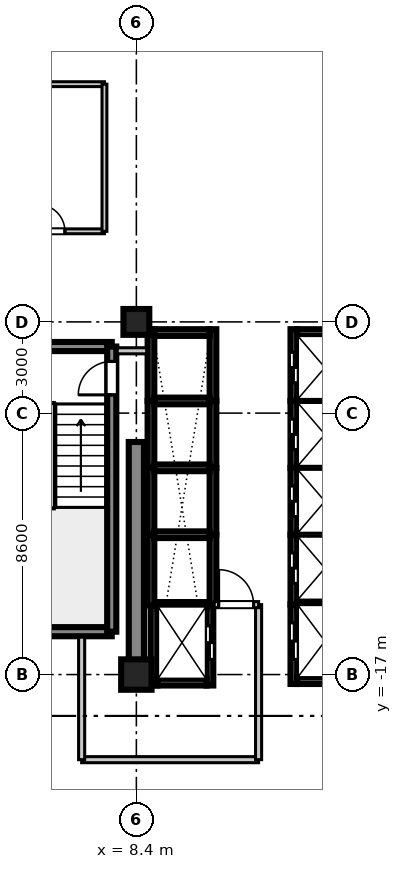
"""IFC4 building model, lengths in metres.
Left out: names, types, materials, properties, quantities, classifications, styles, units other than length and angle.
Written with IfcOpenShell. Run it as: python <this file> out.ifc"""

import sys

from ifc_helpers import new_model, si_unit, direction, frame, frame_2d, origin, origin_2d, place, context, subcontext, project, spatial, rectangle, extrude, source, transform, mapped, element, fill, save


model = new_model("IFC4")
c1 = context("Model", 3, precision=1e-05, world=origin(), true_north=direction((0.0, 1.0)))
c2 = subcontext(c1, "Body", "Model", "MODEL_VIEW")
j1 = project(units=[si_unit("LENGTHUNIT", "METRE"), si_unit("PLANEANGLEUNIT", "RADIAN")], contexts=[c1])
p1 = place(None, origin())
s1 = spatial("IfcSite", under=j1, at=p1, CompositionType="ELEMENT")
p2 = place(p1, origin())
s2 = spatial("IfcBuilding", under=s1, at=p2, CompositionType="ELEMENT")
p3 = place(p2, frame((0.0, 0.0, 227.1)))
s3 = spatial("IfcBuildingStorey", under=s2, at=p3, CompositionType="ELEMENT", Elevation=227.1)
m1 = source(origin(), c2, "Body", "SweptSolid", [
    extrude(rectangle(XDim=1.0, YDim=1.0, at=origin_2d()), origin(), (0.0, 0.0, 1.0), 3.655),
])
p4 = place(p3, frame((8.4, -17.0, 0.0), z_axis=(0.0, 0.0, 1.0), x_axis=(1.0, 0.0, 0.0)))
e1 = element("IfcColumn", 1, at=p4, inside=s3, PredefinedType="COLUMN", context=c2, shape_type="MappedRepresentation", body=[
    mapped(m1, transform((0.0, 0.0, 0.0), scale=1.0)),
])
m2 = source(origin(), c2, "Body", "SweptSolid", [
    extrude(rectangle(XDim=0.85, YDim=0.85, at=origin_2d()), origin(), (0.0, 0.0, 1.0), 3.655),
])
p5 = place(p3, frame((8.4, -5.4, 0.0), z_axis=(0.0, 0.0, 1.0), x_axis=(1.0, 0.0, 0.0)))
e2 = element("IfcColumn", 2, at=p5, inside=s3, PredefinedType="PILASTER", context=c2, shape_type="MappedRepresentation", body=[
    mapped(m2, transform((0.0, 0.0, 0.0), scale=1.0)),
])
m3 = source(origin(), c2, "Body", "SweptSolid", [
    extrude(rectangle(XDim=7.65, YDim=0.5, at=frame_2d((3.825, 0.0))), origin(), (0.0, 0.0, 1.0), 3.41),
])
p6 = place(p3, frame((8.4, -17.0, 0.0), z_axis=(0.0, 0.0, 1.0), x_axis=(0.0, 1.0, 0.0)))
e3 = element("IfcWall", 3, at=p6, inside=s3, PredefinedType="SHEAR", context=c2, shape_type="MappedRepresentation", body=[
    mapped(m3, transform((0.0, 0.0, 0.0), scale=1.0)),
])
m4 = source(origin(), c2, "Body", "SweptSolid", [
    extrude(rectangle(XDim=3.98, YDim=0.3, at=frame_2d((1.99, 0.0))), origin(), (0.0, 0.0, 1.0), 3.41),
])
for number, where, z_axis, x_axis in (
    (4, (3.61, -15.59, 0.0), (0.0, 0.0, 1.0), (1.0, 0.0, 0.0)),
    (5, (3.61, -6.21, 0.0), (0.0, 0.0, 1.0), (1.0, 0.0, 0.0)),
):
    element("IfcWall", number, at=place(p3, frame(where, z_axis=z_axis, x_axis=x_axis)), inside=s3, PredefinedType="SHEAR", context=c2, shape_type="MappedRepresentation", body=[
        mapped(m4, transform((0.0, 0.0, 0.0), scale=1.0)),
    ])
m5 = source(origin(), c2, "Body", "SweptSolid", [
    extrude(rectangle(XDim=9.38, YDim=0.3, at=frame_2d((4.69, 0.0))), origin(), (0.0, 0.0, 1.0), 3.41),
])
p7 = place(p3, frame((7.59, -15.59, 0.0), z_axis=(0.0, 0.0, 1.0), x_axis=(0.0, 1.0, 0.0)))
e6 = element("IfcWall", 6, at=p7, inside=s3, PredefinedType="SHEAR", context=c2, shape_type="MappedRepresentation", body=[
    mapped(m5, transform((0.0, 0.0, 0.0), scale=1.0)),
])
p8 = place(p7, frame((7.79, 0.0, 0.0)))
e7 = element("IfcOpeningElement", 7, at=p8, cuts=e6, PredefinedType="OPENING", context=c2, shape_type="SweptSolid", body=[
    extrude(rectangle(XDim=1.1, YDim=2.15, at=frame_2d((0.55, 1.075))), frame((0.0, 0.16, 0.0), z_axis=(0.0, -1.0, 0.0), x_axis=(1.0, 0.0, 0.0)), (0.0, 0.0, 1.0), 0.32),
])
m6 = source(origin(), c2, "Body", "SweptSolid", [
    extrude(rectangle(XDim=2.36, YDim=0.22, at=frame_2d((1.18, 0.0))), origin(), (0.0, 0.0, 1.0), 3.41),
])
p9 = place(p3, frame((13.58, -8.0, 0.0), z_axis=(0.0, 0.0, 1.0), x_axis=(0.0, 1.0, 0.0)))
e8 = element("IfcWall", 8, at=p9, inside=s3, PredefinedType="SHEAR", context=c2, shape_type="MappedRepresentation", body=[
    mapped(m6, transform((0.0, 0.0, 0.0), scale=1.0)),
])
p10 = place(p9, frame((0.6, 0.0, 0.0)))
e9 = element("IfcOpeningElement", 9, at=p10, cuts=e8, PredefinedType="OPENING", context=c2, shape_type="SweptSolid", body=[
    extrude(rectangle(XDim=1.0, YDim=2.2, at=frame_2d((0.5, 1.1))), frame((0.0, 0.12, 0.0), z_axis=(0.0, -1.0, 0.0), x_axis=(1.0, 0.0, 0.0)), (0.0, 0.0, 1.0), 0.24),
])
m7 = source(origin(), c2, "Body", "SweptSolid", [
    extrude(rectangle(XDim=1.82, YDim=0.22, at=frame_2d((0.91, 0.0))), origin(), (0.0, 0.0, 1.0), 3.41),
])
p11 = place(p3, frame((13.69, -5.75, 0.0), z_axis=(0.0, 0.0, 1.0), x_axis=(1.0, 0.0, 0.0)))
e10 = element("IfcWall", 10, at=p11, inside=s3, PredefinedType="SHEAR", context=c2, shape_type="MappedRepresentation", body=[
    mapped(m7, transform((0.0, 0.0, 0.0), scale=1.0)),
])
m8 = source(origin(), c2, "Body", "SweptSolid", [
    extrude(rectangle(XDim=2.2, YDim=0.22, at=frame_2d((1.1, 0.0))), origin(), (0.0, 0.0, 1.0), 3.41),
])
p12 = place(p3, frame((13.58, -10.2, 0.0), z_axis=(0.0, 0.0, 1.0), x_axis=(0.0, 1.0, 0.0)))
e11 = element("IfcWall", 11, at=p12, inside=s3, PredefinedType="SHEAR", context=c2, shape_type="MappedRepresentation", body=[
    mapped(m8, transform((0.0, 0.0, 0.0), scale=1.0)),
])
p13 = place(p12, frame((0.6, 0.0, 0.0)))
e12 = element("IfcOpeningElement", 12, at=p13, cuts=e11, PredefinedType="OPENING", context=c2, shape_type="SweptSolid", body=[
    extrude(rectangle(XDim=1.0, YDim=2.2, at=frame_2d((0.5, 1.1))), frame((0.0, 0.12, 0.0), z_axis=(0.0, -1.0, 0.0), x_axis=(1.0, 0.0, 0.0)), (0.0, 0.0, 1.0), 0.24),
])
m9 = source(origin(), c2, "Body", "SweptSolid", [
    extrude(rectangle(XDim=1.82, YDim=0.22, at=frame_2d((0.91, 0.0))), origin(), (0.0, 0.0, 1.0), 3.7),
])
p14 = place(p3, frame((13.69, -8.0, 0.0), z_axis=(0.0, 0.0, 1.0), x_axis=(1.0, 0.0, 0.0)))
e13 = element("IfcWall", 13, at=p14, inside=s3, PredefinedType="SHEAR", context=c2, shape_type="MappedRepresentation", body=[
    mapped(m9, transform((0.0, 0.0, 0.0), scale=1.0)),
])
p15 = place(p3, frame((13.58, -12.4, 0.0), z_axis=(0.0, 0.0, 1.0), x_axis=(0.0, 1.0, 0.0)))
e14 = element("IfcWall", 14, at=p15, inside=s3, PredefinedType="SHEAR", context=c2, shape_type="MappedRepresentation", body=[
    mapped(m8, transform((0.0, 0.0, 0.0), scale=1.0)),
])
p16 = place(p15, frame((0.6, 0.0, 0.0)))
e15 = element("IfcOpeningElement", 15, at=p16, cuts=e14, PredefinedType="OPENING", context=c2, shape_type="SweptSolid", body=[
    extrude(rectangle(XDim=1.0, YDim=2.2, at=frame_2d((0.5, 1.1))), frame((0.0, 0.12, 0.0), z_axis=(0.0, -1.0, 0.0), x_axis=(1.0, 0.0, 0.0)), (0.0, 0.0, 1.0), 0.24),
])
p17 = place(p3, frame((13.69, -10.2, 0.0), z_axis=(0.0, 0.0, 1.0), x_axis=(1.0, 0.0, 0.0)))
e16 = element("IfcWall", 16, at=p17, inside=s3, PredefinedType="SHEAR", context=c2, shape_type="MappedRepresentation", body=[
    mapped(m9, transform((0.0, 0.0, 0.0), scale=1.0)),
])
m10 = source(origin(), c2, "Body", "SweptSolid", [
    extrude(rectangle(XDim=2.3, YDim=0.22, at=frame_2d((1.15, 0.0))), origin(), (0.0, 0.0, 1.0), 3.41),
])
p18 = place(p3, frame((13.58, -14.7, 0.0), z_axis=(0.0, 0.0, 1.0), x_axis=(0.0, 1.0, 0.0)))
e17 = element("IfcWall", 17, at=p18, inside=s3, PredefinedType="SHEAR", context=c2, shape_type="MappedRepresentation", body=[
    mapped(m10, transform((0.0, 0.0, 0.0), scale=1.0)),
])
p19 = place(p18, frame((0.7, 0.0, 0.0)))
e18 = element("IfcOpeningElement", 18, at=p19, cuts=e17, PredefinedType="OPENING", context=c2, shape_type="SweptSolid", body=[
    extrude(rectangle(XDim=1.0, YDim=2.2, at=frame_2d((0.5, 1.1))), frame((0.0, 0.12, 0.0), z_axis=(0.0, -1.0, 0.0), x_axis=(1.0, 0.0, 0.0)), (0.0, 0.0, 1.0), 0.24),
])
p20 = place(p3, frame((13.69, -12.4, 0.0), z_axis=(0.0, 0.0, 1.0), x_axis=(1.0, 0.0, 0.0)))
e19 = element("IfcWall", 19, at=p20, inside=s3, PredefinedType="SHEAR", context=c2, shape_type="MappedRepresentation", body=[
    mapped(m9, transform((0.0, 0.0, 0.0), scale=1.0)),
])
for number, where, z_axis, x_axis in (
    (20, (8.88, -8.0, 0.0), (0.0, 0.0, 1.0), (0.0, 1.0, 0.0)),
    (21, (10.92, -8.0, 0.0), (0.0, 0.0, 1.0), (0.0, 1.0, 0.0)),
):
    element("IfcWall", number, at=place(p3, frame(where, z_axis=z_axis, x_axis=x_axis)), inside=s3, PredefinedType="SHEAR", context=c2, shape_type="MappedRepresentation", body=[
        mapped(m6, transform((0.0, 0.0, 0.0), scale=1.0)),
    ])
p21 = place(p3, frame((8.99, -5.75, 0.0), z_axis=(0.0, 0.0, 1.0), x_axis=(1.0, 0.0, 0.0)))
e22 = element("IfcWall", 22, at=p21, inside=s3, PredefinedType="SHEAR", context=c2, shape_type="MappedRepresentation", body=[
    mapped(m7, transform((0.0, 0.0, 0.0), scale=1.0)),
])
for number, where, z_axis, x_axis in (
    (23, (8.88, -10.2, 0.0), (0.0, 0.0, 1.0), (0.0, 1.0, 0.0)),
    (24, (10.92, -10.2, 0.0), (0.0, 0.0, 1.0), (0.0, 1.0, 0.0)),
):
    element("IfcWall", number, at=place(p3, frame(where, z_axis=z_axis, x_axis=x_axis)), inside=s3, PredefinedType="SHEAR", context=c2, shape_type="MappedRepresentation", body=[
        mapped(m8, transform((0.0, 0.0, 0.0), scale=1.0)),
    ])
p22 = place(p3, frame((8.99, -8.0, 0.0), z_axis=(0.0, 0.0, 1.0), x_axis=(1.0, 0.0, 0.0)))
e25 = element("IfcWall", 25, at=p22, inside=s3, PredefinedType="SHEAR", context=c2, shape_type="MappedRepresentation", body=[
    mapped(m9, transform((0.0, 0.0, 0.0), scale=1.0)),
])
for number, where, z_axis, x_axis in (
    (26, (8.88, -12.4, 0.0), (0.0, 0.0, 1.0), (0.0, 1.0, 0.0)),
    (27, (10.92, -12.4, 0.0), (0.0, 0.0, 1.0), (0.0, 1.0, 0.0)),
):
    element("IfcWall", number, at=place(p3, frame(where, z_axis=z_axis, x_axis=x_axis)), inside=s3, PredefinedType="SHEAR", context=c2, shape_type="MappedRepresentation", body=[
        mapped(m8, transform((0.0, 0.0, 0.0), scale=1.0)),
    ])
p23 = place(p3, frame((8.99, -10.2, 0.0), z_axis=(0.0, 0.0, 1.0), x_axis=(1.0, 0.0, 0.0)))
e28 = element("IfcWall", 28, at=p23, inside=s3, PredefinedType="SHEAR", context=c2, shape_type="MappedRepresentation", body=[
    mapped(m9, transform((0.0, 0.0, 0.0), scale=1.0)),
])
m11 = source(origin(), c2, "Body", "SweptSolid", [
    extrude(rectangle(XDim=2.325, YDim=0.22, at=frame_2d((1.163, 0.0))), origin(), (0.0, 0.0, 1.0), 3.41),
])
for number, where, z_axis, x_axis in (
    (29, (8.88, -14.725, 0.0), (0.0, 0.0, 1.0), (0.0, 1.0, 0.0)),
    (30, (10.92, -14.725, 0.0), (0.0, 0.0, 1.0), (0.0, 1.0, 0.0)),
):
    element("IfcWall", number, at=place(p3, frame(where, z_axis=z_axis, x_axis=x_axis)), inside=s3, PredefinedType="SHEAR", context=c2, shape_type="MappedRepresentation", body=[
        mapped(m11, transform((0.0, 0.0, 0.0), scale=1.0)),
    ])
p24 = place(p3, frame((8.99, -12.4, 0.0), z_axis=(0.0, 0.0, 1.0), x_axis=(1.0, 0.0, 0.0)))
e31 = element("IfcWall", 31, at=p24, inside=s3, PredefinedType="SHEAR", context=c2, shape_type="MappedRepresentation", body=[
    mapped(m9, transform((0.0, 0.0, 0.0), scale=1.0)),
])
m12 = source(origin(), c2, "Body", "SweptSolid", [
    extrude(rectangle(XDim=2.635, YDim=0.22, at=frame_2d((1.317, 0.0))), origin(), (0.0, 0.0, 1.0), 3.41),
])
p25 = place(p3, frame((8.98, -17.36, 0.0), z_axis=(0.0, 0.0, 1.0), x_axis=(0.0, 1.0, 0.0)))
e32 = element("IfcWall", 32, at=p25, inside=s3, PredefinedType="SHEAR", context=c2, shape_type="MappedRepresentation", body=[
    mapped(m12, transform((0.0, 0.0, 0.0), scale=1.0)),
])
p26 = place(p3, frame((10.82, -17.36, 0.0), z_axis=(0.0, 0.0, 1.0), x_axis=(0.0, 1.0, 0.0)))
e33 = element("IfcWall", 33, at=p26, inside=s3, PredefinedType="SHEAR", context=c2, shape_type="MappedRepresentation", body=[
    mapped(m12, transform((0.0, 0.0, 0.0), scale=1.0)),
])
p27 = place(p26, frame((0.86, 0.0, 0.0)))
e34 = element("IfcOpeningElement", 34, at=p27, cuts=e33, PredefinedType="OPENING", context=c2, shape_type="SweptSolid", body=[
    extrude(rectangle(XDim=1.1, YDim=2.2, at=frame_2d((0.55, 1.1))), frame((0.0, 0.12, 0.0), z_axis=(0.0, -1.0, 0.0), x_axis=(1.0, 0.0, 0.0)), (0.0, 0.0, 1.0), 0.24),
])
m13 = source(origin(), c2, "Body", "SweptSolid", [
    extrude(rectangle(XDim=1.62, YDim=0.22, at=frame_2d((0.81, 0.0))), origin(), (0.0, 0.0, 1.0), 3.41),
])
p28 = place(p3, frame((9.09, -17.25, 0.0), z_axis=(0.0, 0.0, 1.0), x_axis=(1.0, 0.0, 0.0)))
e35 = element("IfcWall", 35, at=p28, inside=s3, PredefinedType="SHEAR", context=c2, shape_type="MappedRepresentation", body=[
    mapped(m13, transform((0.0, 0.0, 0.0), scale=1.0)),
])
m14 = source(origin(), c2, "Body", "SweptSolid", [
    extrude(rectangle(XDim=1.62, YDim=0.22, at=frame_2d((0.81, 0.0))), origin(), (0.0, 0.0, 1.0), 3.7),
])
p29 = place(p3, frame((9.09, -14.725, 0.0), z_axis=(0.0, 0.0, 1.0), x_axis=(1.0, 0.0, 0.0)))
e36 = element("IfcWall", 36, at=p29, inside=s3, PredefinedType="SHEAR", context=c2, shape_type="MappedRepresentation", body=[
    mapped(m14, transform((0.0, 0.0, 0.0), scale=1.0)),
])
m15 = source(origin(), c2, "Body", "SweptSolid", [
    extrude(rectangle(XDim=2.61, YDim=0.22, at=frame_2d((1.305, 0.0))), origin(), (0.0, 0.0, 1.0), 3.41),
])
p30 = place(p3, frame((13.58, -17.31, 0.0), z_axis=(0.0, 0.0, 1.0), x_axis=(0.0, 1.0, 0.0)))
e37 = element("IfcWall", 37, at=p30, inside=s3, PredefinedType="SHEAR", context=c2, shape_type="MappedRepresentation", body=[
    mapped(m15, transform((0.0, 0.0, 0.0), scale=1.0)),
])
p31 = place(p30, frame((0.81, 0.0, 0.0)))
e38 = element("IfcOpeningElement", 38, at=p31, cuts=e37, PredefinedType="OPENING", context=c2, shape_type="SweptSolid", body=[
    extrude(rectangle(XDim=1.2, YDim=2.2, at=frame_2d((0.6, 1.1))), frame((0.0, 0.12, 0.0), z_axis=(0.0, -1.0, 0.0), x_axis=(1.0, 0.0, 0.0)), (0.0, 0.0, 1.0), 0.24),
])
p32 = place(p3, frame((13.69, -17.2, 0.0), z_axis=(0.0, 0.0, 1.0), x_axis=(1.0, 0.0, 0.0)))
e39 = element("IfcWall", 39, at=p32, inside=s3, PredefinedType="SHEAR", context=c2, shape_type="MappedRepresentation", body=[
    mapped(m7, transform((0.0, 0.0, 0.0), scale=1.0)),
])
p33 = place(p3, frame((13.69, -14.7, 0.0), z_axis=(0.0, 0.0, 1.0), x_axis=(1.0, 0.0, 0.0)))
e40 = element("IfcWall", 40, at=p33, inside=s3, PredefinedType="SHEAR", context=c2, shape_type="MappedRepresentation", body=[
    mapped(m9, transform((0.0, 0.0, 0.0), scale=1.0)),
])
m16 = source(origin(), c2, "Body", "SweptSolid", [
    extrude(rectangle(XDim=5.82, YDim=0.2, at=frame_2d((2.91, 0.0))), origin(), (0.0, 0.0, 1.0), 2.75),
])
p34 = place(p3, frame((6.6, -19.8, 0.0), z_axis=(0.0, 0.0, 1.0), x_axis=(1.0, 0.0, 0.0)))
e41 = element("IfcWall", 41, at=p34, inside=s3, PredefinedType="PARTITIONING", context=c2, shape_type="MappedRepresentation", body=[
    mapped(m16, transform((0.0, 0.0, 0.0), scale=1.0)),
])
m17 = source(origin(), c2, "Body", "SweptSolid", [
    extrude(rectangle(XDim=4.03, YDim=0.2, at=frame_2d((2.015, 0.0))), origin(), (0.0, 0.0, 1.0), 2.75),
])
p35 = place(p3, frame((6.6, -19.8, 0.0), z_axis=(0.0, 0.0, 1.0), x_axis=(0.0, 1.0, 0.0)))
e42 = element("IfcWall", 42, at=p35, inside=s3, PredefinedType="PARTITIONING", context=c2, shape_type="MappedRepresentation", body=[
    mapped(m17, transform((0.0, 0.0, 0.0), scale=1.0)),
])
m18 = source(origin(), c2, "Body", "SweptSolid", [
    extrude(rectangle(XDim=5.1, YDim=0.2, at=frame_2d((2.55, 0.0))), origin(), (0.0, 0.0, 1.0), 2.75),
])
p36 = place(p3, frame((12.42, -19.8, 0.0), z_axis=(0.0, 0.0, 1.0), x_axis=(0.0, 1.0, 0.0)))
e43 = element("IfcWall", 43, at=p36, inside=s3, PredefinedType="PARTITIONING", context=c2, shape_type="MappedRepresentation", body=[
    mapped(m18, transform((0.0, 0.0, 0.0), scale=1.0)),
])
m19 = source(origin(), c2, "Body", "SweptSolid", [
    extrude(rectangle(XDim=1.46, YDim=0.2, at=frame_2d((0.73, 0.0))), origin(), (0.0, 0.0, 1.0), 2.75),
])
p37 = place(p3, frame((10.96, -14.7, 0.0), z_axis=(0.0, 0.0, 1.0), x_axis=(1.0, 0.0, 0.0)))
e44 = element("IfcWall", 44, at=p37, inside=s3, PredefinedType="PARTITIONING", context=c2, shape_type="MappedRepresentation", body=[
    mapped(m19, transform((0.0, 0.0, 0.0), scale=1.0)),
])
p38 = place(p37, frame((0.145, 0.0, 0.0)))
e45 = element("IfcOpeningElement", 45, at=p38, cuts=e44, PredefinedType="OPENING", context=c2, shape_type="SweptSolid", body=[
    extrude(rectangle(XDim=1.15, YDim=2.15, at=frame_2d((0.575, 1.075))), frame((0.0, 0.11, 0.0), z_axis=(0.0, -1.0, 0.0), x_axis=(1.0, 0.0, 0.0)), (0.0, 0.0, 1.0), 0.22),
])
m20 = source(origin(), c2, "Body", "SweptSolid", [
    extrude(rectangle(XDim=0.97, YDim=0.2, at=frame_2d((0.485, 0.0))), origin(), (0.0, 0.0, 1.0), 2.75),
])
p39 = place(p3, frame((7.77, -6.35, 0.0), z_axis=(0.0, 0.0, 1.0), x_axis=(1.0, 0.0, 0.0)))
e46 = element("IfcWall", 46, at=p39, inside=s3, PredefinedType="PARTITIONING", context=c2, shape_type="MappedRepresentation", body=[
    mapped(m20, transform((0.0, 0.0, 0.0), scale=1.0)),
])
m21 = source(origin(), c2, "Body", "SweptSolid", [
    extrude(rectangle(XDim=2.892, YDim=0.16, at=frame_2d((1.446, 0.0))), origin(), (0.0, 0.0, 1.0), 2.75),
])
p40 = place(p3, frame((4.458, -2.42, 0.0), z_axis=(0.0, 0.0, 1.0), x_axis=(1.0, 0.0, 0.0)))
e47 = element("IfcWall", 47, at=p40, inside=s3, PredefinedType="PARTITIONING", context=c2, shape_type="MappedRepresentation", body=[
    mapped(m21, transform((0.0, 0.0, 0.0), scale=1.0)),
])
p41 = place(p40, frame((0.711, 0.0, 0.0)))
e48 = element("IfcOpeningElement", 48, at=p41, cuts=e47, PredefinedType="OPENING", context=c2, shape_type="SweptSolid", body=[
    extrude(rectangle(XDim=0.88, YDim=2.1, at=frame_2d((0.44, 1.05))), frame((0.0, 0.09, 0.0), z_axis=(0.0, -1.0, 0.0), x_axis=(1.0, 0.0, 0.0)), (0.0, 0.0, 1.0), 0.18),
])
p42 = place(p3, frame((4.458, 2.42, 0.0), z_axis=(0.0, 0.0, 1.0), x_axis=(1.0, 0.0, 0.0)))
e49 = element("IfcWall", 49, at=p42, inside=s3, PredefinedType="PARTITIONING", context=c2, shape_type="MappedRepresentation", body=[
    mapped(m21, transform((0.0, 0.0, 0.0), scale=1.0)),
])
m22 = source(origin(), c2, "Body", "SweptSolid", [
    extrude(rectangle(XDim=4.84, YDim=0.16, at=frame_2d((2.42, 0.0))), origin(), (0.0, 0.0, 1.0), 2.75),
])
p43 = place(p3, frame((7.35, -2.42, 0.0), z_axis=(0.0, 0.0, 1.0), x_axis=(0.0, 1.0, 0.0)))
e50 = element("IfcWall", 50, at=p43, inside=s3, PredefinedType="PARTITIONING", context=c2, shape_type="MappedRepresentation", body=[
    mapped(m22, transform((0.0, 0.0, 0.0), scale=1.0)),
])
m23 = source(origin(), c2, "Body", "SweptSolid", [
    extrude(rectangle(XDim=1.1, YDim=2.15, at=frame_2d((0.55, 1.075))), frame((0.0, 0.025, 0.0), z_axis=(0.0, -1.0, 0.0), x_axis=(1.0, 0.0, 0.0)), (0.0, 0.0, 1.0), 0.05),
])
p44 = place(p8, origin())
e51 = element("IfcDoor", 51, at=p44, inside=s3, OperationType="SINGLE_SWING_LEFT", PredefinedType="DOOR", context=c2, shape_type="MappedRepresentation", body=[
    mapped(m23, transform((0.0, 0.0, 0.0), scale=1.0)),
])
fill(e7, e51)
m24 = source(origin(), c2, "Body", "SweptSolid", [
    extrude(rectangle(XDim=1.0, YDim=2.2, at=frame_2d((0.5, 1.1))), frame((0.0, 0.025, 0.0), z_axis=(0.0, -1.0, 0.0), x_axis=(1.0, 0.0, 0.0)), (0.0, 0.0, 1.0), 0.05),
])
p45 = place(p10, origin())
e52 = element("IfcDoor", 52, at=p45, inside=s3, OperationType="DOUBLE_DOOR_SLIDING", PredefinedType="DOOR", context=c2, shape_type="MappedRepresentation", body=[
    mapped(m24, transform((0.0, 0.0, 0.0), scale=1.0)),
])
fill(e9, e52)
p46 = place(p13, origin())
e53 = element("IfcDoor", 53, at=p46, inside=s3, OperationType="DOUBLE_DOOR_SLIDING", PredefinedType="DOOR", context=c2, shape_type="MappedRepresentation", body=[
    mapped(m24, transform((0.0, 0.0, 0.0), scale=1.0)),
])
fill(e12, e53)
p47 = place(p16, origin())
e54 = element("IfcDoor", 54, at=p47, inside=s3, OperationType="DOUBLE_DOOR_SLIDING", PredefinedType="DOOR", context=c2, shape_type="MappedRepresentation", body=[
    mapped(m24, transform((0.0, 0.0, 0.0), scale=1.0)),
])
fill(e15, e54)
p48 = place(p19, origin())
e55 = element("IfcDoor", 55, at=p48, inside=s3, OperationType="DOUBLE_DOOR_SLIDING", PredefinedType="DOOR", context=c2, shape_type="MappedRepresentation", body=[
    mapped(m24, transform((0.0, 0.0, 0.0), scale=1.0)),
])
fill(e18, e55)
m25 = source(origin(), c2, "Body", "SweptSolid", [
    extrude(rectangle(XDim=1.1, YDim=2.2, at=frame_2d((0.55, 1.1))), frame((0.0, 0.025, 0.0), z_axis=(0.0, -1.0, 0.0), x_axis=(1.0, 0.0, 0.0)), (0.0, 0.0, 1.0), 0.05),
])
p49 = place(p27, frame((1.1, 0.0, 0.0), z_axis=(0.0, 0.0, 1.0), x_axis=(-1.0, 0.0, 0.0)))
e56 = element("IfcDoor", 56, at=p49, inside=s3, OperationType="DOUBLE_DOOR_SLIDING", PredefinedType="DOOR", context=c2, shape_type="MappedRepresentation", body=[
    mapped(m25, transform((0.0, 0.0, 0.0), scale=1.0)),
])
fill(e34, e56)
m26 = source(origin(), c2, "Body", "SweptSolid", [
    extrude(rectangle(XDim=1.2, YDim=2.2, at=frame_2d((0.6, 1.1))), frame((0.0, 0.025, 0.0), z_axis=(0.0, -1.0, 0.0), x_axis=(1.0, 0.0, 0.0)), (0.0, 0.0, 1.0), 0.05),
])
p50 = place(p31, origin())
e57 = element("IfcDoor", 57, at=p50, inside=s3, OperationType="DOUBLE_DOOR_SLIDING", PredefinedType="DOOR", context=c2, shape_type="MappedRepresentation", body=[
    mapped(m26, transform((0.0, 0.0, 0.0), scale=1.0)),
])
fill(e38, e57)
m27 = source(origin(), c2, "Body", "SweptSolid", [
    extrude(rectangle(XDim=1.15, YDim=2.15, at=frame_2d((0.575, 1.075))), frame((0.0, 0.025, 0.0), z_axis=(0.0, -1.0, 0.0), x_axis=(1.0, 0.0, 0.0)), (0.0, 0.0, 1.0), 0.05),
])
p51 = place(p38, origin())
e58 = element("IfcDoor", 58, at=p51, inside=s3, OperationType="SINGLE_SWING_LEFT", PredefinedType="DOOR", context=c2, shape_type="MappedRepresentation", body=[
    mapped(m27, transform((0.0, 0.0, 0.0), scale=1.0)),
])
fill(e45, e58)
m28 = source(origin(), c2, "Body", "SweptSolid", [
    extrude(rectangle(XDim=0.88, YDim=2.1, at=frame_2d((0.44, 1.05))), frame((0.0, 0.025, 0.0), z_axis=(0.0, -1.0, 0.0), x_axis=(1.0, 0.0, 0.0)), (0.0, 0.0, 1.0), 0.05),
])
p52 = place(p41, origin())
e59 = element("IfcDoor", 59, at=p52, inside=s3, OperationType="SINGLE_SWING_LEFT", PredefinedType="DOOR", context=c2, shape_type="MappedRepresentation", body=[
    mapped(m28, transform((0.0, 0.0, 0.0), scale=1.0)),
])
fill(e48, e59)
save(model, sys.argv[1])
